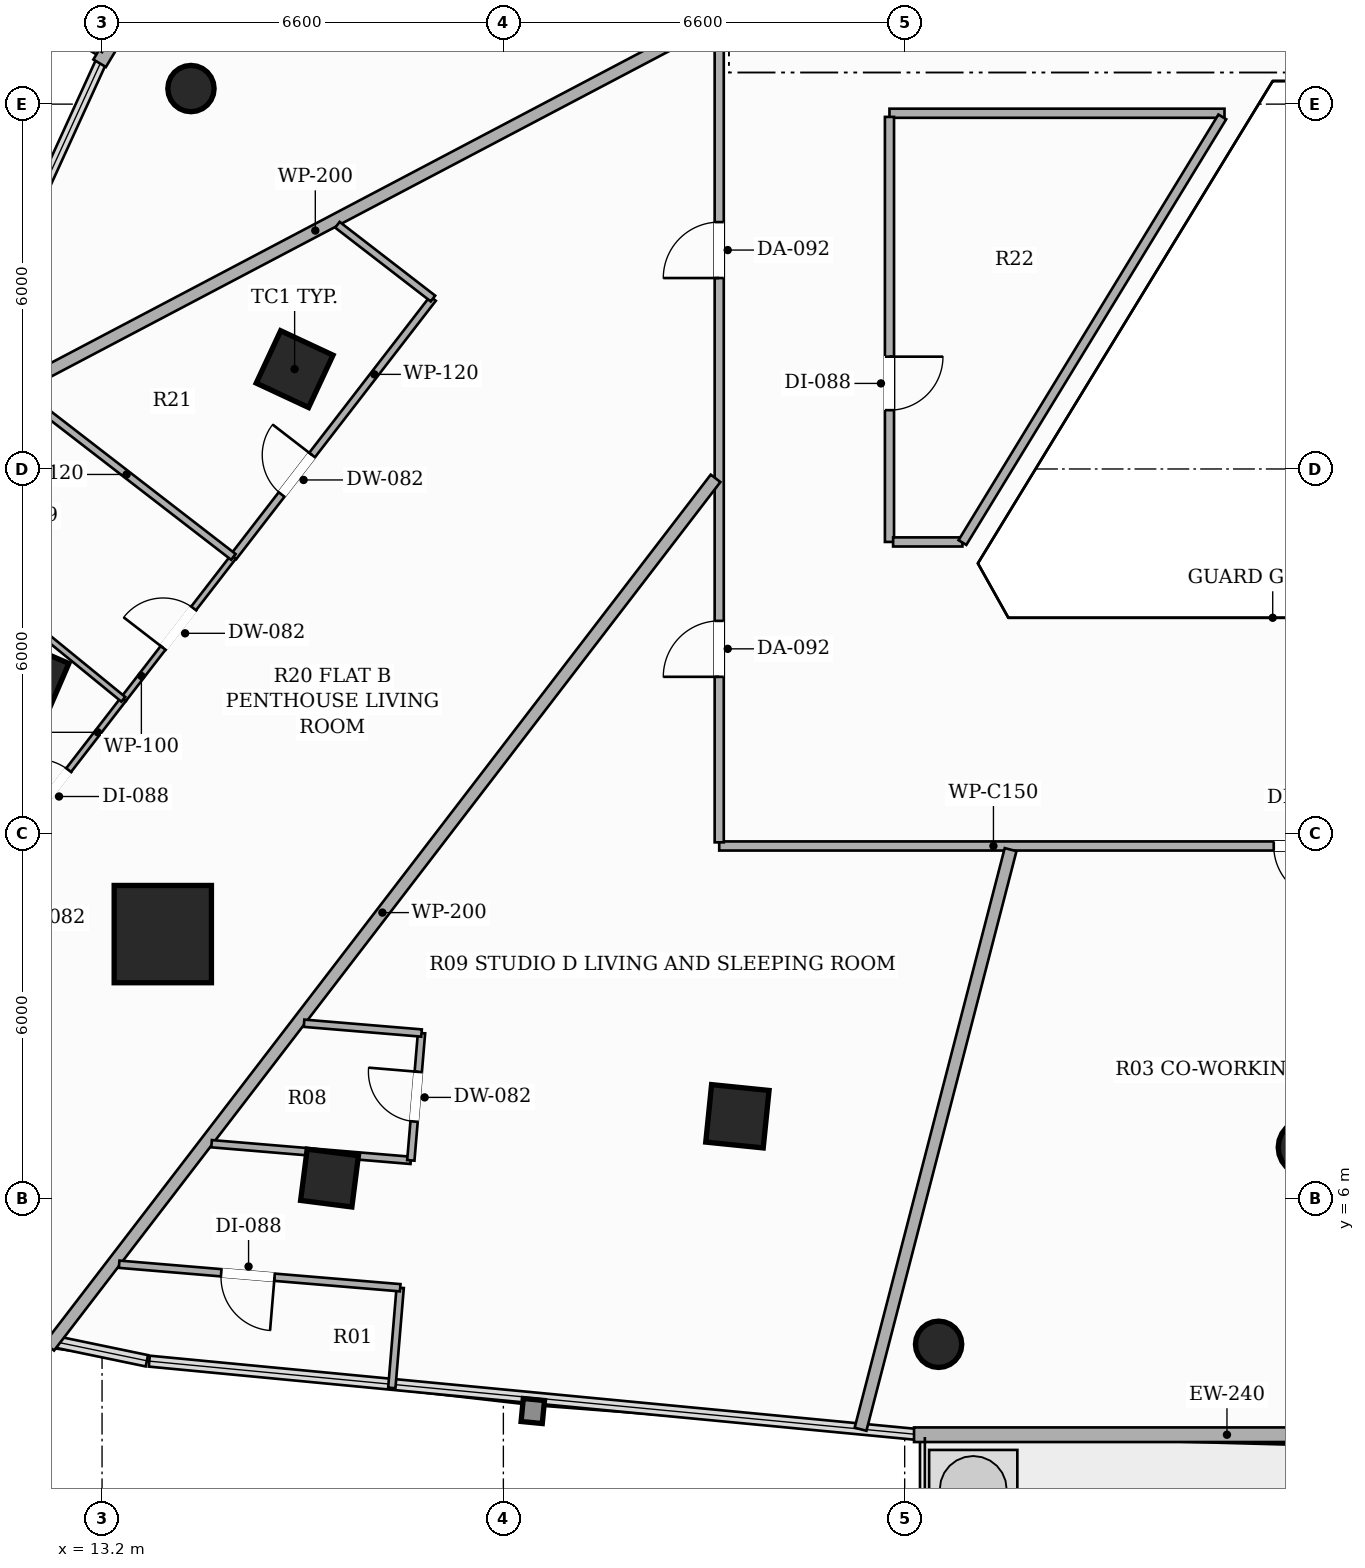
"""IFC4 building model, lengths in metres.
Left out: names, types, materials, properties, quantities, classifications, styles, units other than length and angle.
Written with IfcOpenShell. Run it as: python <this file> out.ifc"""

import sys

from ifc_helpers import new_model, si_unit, direction, frame, frame_2d, origin, origin_2d, place, context, subcontext, project, spatial, rectangle, hollow_rectangle, hollow_circle, extrude, element, fill, save


model = new_model("IFC4")
c1 = context("Model", 3, precision=1e-05, world=origin(), true_north=direction((0.0, 1.0)))
c2 = subcontext(c1, "Body", "Model", "MODEL_VIEW")
j1 = project(units=[si_unit("LENGTHUNIT", "METRE"), si_unit("PLANEANGLEUNIT", "RADIAN")], contexts=[c1])
p1 = place(None, origin())
s1 = spatial("IfcSite", under=j1, at=p1, CompositionType="ELEMENT")
p2 = place(p1, origin())
s2 = spatial("IfcBuilding", under=s1, at=p2, CompositionType="ELEMENT")
p3 = place(p2, frame((0.0, 0.0, 77.45)))
s3 = spatial("IfcBuildingStorey", under=s2, at=p3, CompositionType="ELEMENT", Elevation=77.45)
p4 = place(p3, frame((14.199, 10.351, 0.0), z_axis=(0.0, 0.0, 1.0), x_axis=(1.0, 0.0, 0.0)))
e1 = element("IfcColumn", 1, at=p4, inside=s3, PredefinedType="COLUMN", context=c2, shape_type="SweptSolid", body=[
    extrude(hollow_rectangle(XDim=1.6, YDim=1.6, WallThickness=0.05, at=origin_2d()), origin(), (0.0, 0.0, 1.0), 3.3),
])
for number, where, z_axis, x_axis in (
    (2, (16.367, 19.642, 0.0), (0.0, 0.0, 1.0), (0.423, 0.906, 0.0)),
    (3, (23.649, 7.355, 0.0), (0.0, 0.0, 1.0), (-0.995, 0.101, 0.0)),
):
    element("IfcColumn", number, at=place(p3, frame(where, z_axis=z_axis, x_axis=x_axis)), inside=s3, PredefinedType="COLUMN", context=c2, shape_type="SweptSolid", body=[
        extrude(hollow_rectangle(XDim=0.95, YDim=0.95, WallThickness=0.032, at=origin_2d()), origin(), (0.0, 0.0, 1.0), 3.3),
    ])
p5 = place(p3, frame((33.0, 6.844, 0.0), z_axis=(0.0, 0.0, 1.0), x_axis=(1.0, 0.0, 0.0)))
e4 = element("IfcColumn", 4, at=p5, inside=s3, PredefinedType="COLUMN", context=c2, shape_type="SweptSolid", body=[
    extrude(hollow_circle(Radius=0.457, WallThickness=0.025, at=origin_2d()), origin(), (0.0, 0.0, 1.0), 3.3),
])
for number, where, z_axis, x_axis in (
    (5, (12.095, 14.58, 0.0), (0.0, 0.0, 1.0), (0.397, 0.918, 0.0)),
    (6, (16.941, 6.339, 0.0), (0.0, 0.0, 1.0), (-0.992, 0.127, 0.0)),
):
    element("IfcColumn", number, at=place(p3, frame(where, z_axis=z_axis, x_axis=x_axis)), inside=s3, PredefinedType="COLUMN", context=c2, shape_type="SweptSolid", body=[
        extrude(hollow_rectangle(XDim=0.85, YDim=0.85, WallThickness=0.028, at=origin_2d()), origin(), (0.0, 0.0, 1.0), 3.3),
    ])
for number, where, z_axis, x_axis in (
    (7, (14.662, 24.256, 0.0), (0.0, 0.0, 1.0), (1.0, 0.0, 0.0)),
    (8, (26.958, 3.605, 0.0), (0.0, 0.0, 1.0), (1.0, 0.0, 0.0)),
):
    element("IfcColumn", number, at=place(p3, frame(where, z_axis=z_axis, x_axis=x_axis)), inside=s3, PredefinedType="COLUMN", context=c2, shape_type="SweptSolid", body=[
        extrude(hollow_circle(Radius=0.381, WallThickness=0.022, at=origin_2d()), origin(), (0.0, 0.0, 1.0), 3.3),
    ])
p6 = place(p3, frame((19.576, 35.37, 0.0), z_axis=(0.0, 0.0, 1.0), x_axis=(-0.514331693128, -0.85759134175, 0.0)))
e9 = element("IfcWall", 9, at=p6, inside=s3, PredefinedType="SOLIDWALL", context=c2, shape_type="SweptSolid", body=[
    extrude(rectangle(XDim=12.474, YDim=0.24, at=frame_2d((6.237, 0.0))), origin(), (0.0, 0.0, 1.0), 2.624),
])
p7 = place(p6, frame((9.977, 0.0, 0.0)))
e10 = element("IfcOpeningElement", 10, at=p7, cuts=e9, PredefinedType="OPENING", context=c2, shape_type="SweptSolid", body=[
    extrude(rectangle(XDim=1.8, YDim=2.2, at=frame_2d((0.9, 1.1))), frame((0.0, 0.13, 0.0), z_axis=(0.0, -1.0, 0.0), x_axis=(1.0, 0.0, 0.0)), (0.0, 0.0, 1.0), 0.26),
])
p8 = place(p3, frame((26.554, 2.118, 0.0), z_axis=(0.0, 0.0, 1.0), x_axis=(1.0, 0.0, 0.0)))
e11 = element("IfcWall", 11, at=p8, inside=s3, PredefinedType="SOLIDWALL", context=c2, shape_type="SweptSolid", body=[
    extrude(rectangle(XDim=12.891, YDim=0.24, at=frame_2d((6.446, 0.0))), origin(), (0.0, 0.0, 1.0), 2.624),
])
p9 = place(p8, frame((10.393, 0.0, 0.0)))
e12 = element("IfcOpeningElement", 12, at=p9, cuts=e11, PredefinedType="OPENING", context=c2, shape_type="SweptSolid", body=[
    extrude(rectangle(XDim=1.8, YDim=2.2, at=frame_2d((0.9, 1.1))), frame((0.0, 0.13, 0.0), z_axis=(0.0, -1.0, 0.0), x_axis=(1.0, 0.0, 0.0)), (0.0, 0.0, 1.0), 0.26),
])
p10 = place(p3, frame((42.59, 11.8, 0.0), z_axis=(0.0, 0.0, 1.0), x_axis=(-1.0, 0.0, 0.0)))
e13 = element("IfcWall", 13, at=p10, inside=s3, PredefinedType="PARTITIONING", context=c2, shape_type="SweptSolid", body=[
    extrude(rectangle(XDim=19.24, YDim=0.15, at=frame_2d((9.62, 0.0))), origin(), (0.0, 0.0, 1.0), 2.669),
])
p11 = place(p10, frame((9.24, 0.0, 0.0)))
e14 = element("IfcOpeningElement", 14, at=p11, cuts=e13, PredefinedType="OPENING", context=c2, shape_type="SweptSolid", body=[
    extrude(rectangle(XDim=0.88, YDim=2.1, at=frame_2d((0.44, 1.05))), frame((0.0, 0.085, 0.0), z_axis=(0.0, -1.0, 0.0), x_axis=(1.0, 0.0, 0.0)), (0.0, 0.0, 1.0), 0.17),
])
p12 = place(p10, frame((2.174, 0.0, 0.0)))
e15 = element("IfcOpeningElement", 15, at=p12, cuts=e13, PredefinedType="OPENING", context=c2, shape_type="SweptSolid", body=[
    extrude(rectangle(XDim=0.88, YDim=2.1, at=frame_2d((0.44, 1.05))), frame((0.0, 0.085, 0.0), z_axis=(0.0, -1.0, 0.0), x_axis=(1.0, 0.0, 0.0)), (0.0, 0.0, 1.0), 0.17),
])
p13 = place(p3, frame((23.35, 11.86, 0.0), z_axis=(0.0, 0.0, 1.0), x_axis=(0.0, 1.0, 0.0)))
e16 = element("IfcWall", 16, at=p13, inside=s3, PredefinedType="PARTITIONING", context=c2, shape_type="SweptSolid", body=[
    extrude(rectangle(XDim=25.04, YDim=0.15, at=frame_2d((12.52, 0.0))), origin(), (0.0, 0.0, 1.0), 2.413),
])
p14 = place(p13, frame((18.695, 0.0, 0.0)))
e17 = element("IfcOpeningElement", 17, at=p14, cuts=e16, PredefinedType="OPENING", context=c2, shape_type="SweptSolid", body=[
    extrude(rectangle(XDim=0.88, YDim=2.1, at=frame_2d((0.44, 1.05))), frame((0.0, 0.085, 0.0), z_axis=(0.0, -1.0, 0.0), x_axis=(1.0, 0.0, 0.0)), (0.0, 0.0, 1.0), 0.17),
])
p15 = place(p13, frame((9.28, 0.0, 0.0)))
e18 = element("IfcOpeningElement", 18, at=p15, cuts=e16, PredefinedType="OPENING", context=c2, shape_type="SweptSolid", body=[
    extrude(rectangle(XDim=0.92, YDim=2.15, at=frame_2d((0.46, 1.075))), frame((0.0, 0.085, 0.0), z_axis=(0.0, -1.0, 0.0), x_axis=(1.0, 0.0, 0.0)), (0.0, 0.0, 1.0), 0.17),
])
p16 = place(p13, frame((2.722, 0.0, 0.0)))
e19 = element("IfcOpeningElement", 19, at=p16, cuts=e16, PredefinedType="OPENING", context=c2, shape_type="SweptSolid", body=[
    extrude(rectangle(XDim=0.92, YDim=2.15, at=frame_2d((0.46, 1.075))), frame((0.0, 0.085, 0.0), z_axis=(0.0, -1.0, 0.0), x_axis=(1.0, 0.0, 0.0)), (0.0, 0.0, 1.0), 0.17),
])
p17 = place(p3, frame((31.66, 23.85, 0.0), z_axis=(0.0, 0.0, 1.0), x_axis=(-1.0, 0.0, 0.0)))
e20 = element("IfcWall", 20, at=p17, inside=s3, PredefinedType="PARTITIONING", context=c2, shape_type="SweptSolid", body=[
    extrude(rectangle(XDim=5.51, YDim=0.15, at=frame_2d((2.755, 0.0))), origin(), (0.0, 0.0, 1.0), 2.669),
])
p18 = place(p3, frame((26.15, 23.79, 0.0), z_axis=(0.0, 0.0, 1.0), x_axis=(0.0, -1.0, 0.0)))
e21 = element("IfcWall", 21, at=p18, inside=s3, PredefinedType="PARTITIONING", context=c2, shape_type="SweptSolid", body=[
    extrude(rectangle(XDim=6.99, YDim=0.15, at=frame_2d((3.495, 0.0))), origin(), (0.0, 0.0, 1.0), 2.669),
])
p19 = place(p18, frame((3.943, 0.0, 0.0)))
e22 = element("IfcOpeningElement", 22, at=p19, cuts=e21, PredefinedType="OPENING", context=c2, shape_type="SweptSolid", body=[
    extrude(rectangle(XDim=0.88, YDim=2.1, at=frame_2d((0.44, 1.05))), frame((0.0, 0.085, 0.0), z_axis=(0.0, -1.0, 0.0), x_axis=(1.0, 0.0, 0.0)), (0.0, 0.0, 1.0), 0.17),
])
p20 = place(p3, frame((26.21, 16.8, 0.0), z_axis=(0.0, 0.0, 1.0), x_axis=(1.0, 0.0, 0.0)))
e23 = element("IfcWall", 23, at=p20, inside=s3, PredefinedType="PARTITIONING", context=c2, shape_type="SweptSolid", body=[
    extrude(rectangle(XDim=1.14, YDim=0.15, at=frame_2d((0.57, 0.0))), origin(), (0.0, 0.0, 1.0), 3.06),
])
p21 = place(p3, frame((27.35, 16.79, 0.0), z_axis=(0.0, 0.0, 1.0), x_axis=(0.521108010454, 0.853490738931, 0.0)))
e24 = element("IfcWall", 24, at=p21, inside=s3, PredefinedType="PARTITIONING", context=c2, shape_type="SweptSolid", body=[
    extrude(rectangle(XDim=8.202, YDim=0.15, at=frame_2d((4.101, 0.0))), origin(), (0.0, 0.0, 1.0), 2.669),
])
p22 = place(p3, frame((23.29, 25.387, 0.0), z_axis=(0.0, 0.0, 1.0), x_axis=(-0.884824599801, -0.465924272373, 0.0)))
e25 = element("IfcWall", 25, at=p22, inside=s3, PredefinedType="PARTITIONING", context=c2, shape_type="SweptSolid", body=[
    extrude(rectangle(XDim=14.88, YDim=0.2, at=frame_2d((7.44, 0.0))), origin(), (0.0, 0.0, 1.0), 2.413),
])
p23 = place(p3, frame((23.29, 17.846, 0.0), z_axis=(0.0, 0.0, 1.0), x_axis=(-0.608736412859, -0.793372535232, 0.0)))
e26 = element("IfcWall", 26, at=p23, inside=s3, PredefinedType="PARTITIONING", context=c2, shape_type="SweptSolid", body=[
    extrude(rectangle(XDim=18.003, YDim=0.2, at=frame_2d((9.001, 0.0))), origin(), (0.0, 0.0, 1.0), 2.413),
])
p24 = place(p3, frame((28.142, 11.74, 0.0), z_axis=(0.0, 0.0, 1.0), x_axis=(-0.250654087156, -0.968076716274, 0.0)))
e27 = element("IfcWall", 27, at=p24, inside=s3, PredefinedType="PARTITIONING", context=c2, shape_type="SweptSolid", body=[
    extrude(rectangle(XDim=9.846, YDim=0.2, at=frame_2d((4.923, 0.0))), origin(), (0.0, 0.0, 1.0), 2.413),
])
p25 = place(p3, frame((15.36, 16.554, 0.0), z_axis=(0.0, 0.0, 1.0), x_axis=(0.611289599194, 0.791406991324, 0.0)))
e28 = element("IfcWall", 28, at=p25, inside=s3, PredefinedType="PARTITIONING", context=c2, shape_type="SweptSolid", body=[
    extrude(rectangle(XDim=5.369, YDim=0.12, at=frame_2d((2.685, 0.0))), origin(), (0.0, 0.0, 1.0), 2.669),
])
p26 = place(p25, frame((1.297, 0.0, 0.0)))
e29 = element("IfcOpeningElement", 29, at=p26, cuts=e28, PredefinedType="OPENING", context=c2, shape_type="SweptSolid", body=[
    extrude(rectangle(XDim=0.82, YDim=2.1, at=frame_2d((0.41, 1.05))), frame((0.0, 0.07, 0.0), z_axis=(0.0, -1.0, 0.0), x_axis=(1.0, 0.0, 0.0)), (0.0, 0.0, 1.0), 0.14),
])
p27 = place(p3, frame((18.642, 20.803, 0.0), z_axis=(0.0, 0.0, 1.0), x_axis=(-0.791493240875, 0.611177919799, 0.0)))
e30 = element("IfcWall", 30, at=p27, inside=s3, PredefinedType="PARTITIONING", context=c2, shape_type="SweptSolid", body=[
    extrude(rectangle(XDim=1.985, YDim=0.12, at=frame_2d((0.992, 0.0))), origin(), (0.0, 0.0, 1.0), 2.669),
])
p28 = place(p3, frame((11.741, 11.87, 0.0), z_axis=(0.0, 0.0, 1.0), x_axis=(0.61134418085, 0.791364828976, 0.0)))
e31 = element("IfcWall", 31, at=p28, inside=s3, PredefinedType="PARTITIONING", context=c2, shape_type="SweptSolid", body=[
    extrude(rectangle(XDim=2.959, YDim=0.1, at=frame_2d((1.479, 0.0))), origin(), (0.0, 0.0, 1.0), 2.413),
])
p29 = place(p28, frame((0.608, 0.0, 0.0)))
e32 = element("IfcOpeningElement", 32, at=p29, cuts=e31, PredefinedType="OPENING", context=c2, shape_type="SweptSolid", body=[
    extrude(rectangle(XDim=0.88, YDim=2.1, at=frame_2d((0.44, 1.05))), frame((0.0, 0.06, 0.0), z_axis=(0.0, -1.0, 0.0), x_axis=(1.0, 0.0, 0.0)), (0.0, 0.0, 1.0), 0.12),
])
p30 = place(p3, frame((13.55, 14.212, 0.0), z_axis=(0.0, 0.0, 1.0), x_axis=(0.611510880037, 0.791236022686, 0.0)))
e33 = element("IfcWall", 33, at=p30, inside=s3, PredefinedType="PARTITIONING", context=c2, shape_type="SweptSolid", body=[
    extrude(rectangle(XDim=2.96, YDim=0.1, at=frame_2d((1.48, 0.0))), origin(), (0.0, 0.0, 1.0), 3.06),
])
p31 = place(p30, frame((1.07, 0.0, 0.0)))
e34 = element("IfcOpeningElement", 34, at=p31, cuts=e33, PredefinedType="OPENING", context=c2, shape_type="SweptSolid", body=[
    extrude(rectangle(XDim=0.82, YDim=2.1, at=frame_2d((0.41, 1.05))), frame((0.0, 0.06, 0.0), z_axis=(0.0, -1.0, 0.0), x_axis=(1.0, 0.0, 0.0)), (0.0, 0.0, 1.0), 0.12),
])
p32 = place(p3, frame((15.36, 16.554, 0.0), z_axis=(0.0, 0.0, 1.0), x_axis=(-0.79138059941, 0.611323766, 0.0)))
e35 = element("IfcWall", 35, at=p32, inside=s3, PredefinedType="PARTITIONING", context=c2, shape_type="SweptSolid", body=[
    extrude(rectangle(XDim=4.437, YDim=0.12, at=frame_2d((2.218, 0.0))), origin(), (0.0, 0.0, 1.0), 2.413),
])
p33 = place(p3, frame((9.654, 17.394, 0.0), z_axis=(0.0, 0.0, 1.0), x_axis=(0.774493289837, -0.63258212431, 0.0)))
e36 = element("IfcWall", 36, at=p33, inside=s3, PredefinedType="PARTITIONING", context=c2, shape_type="SweptSolid", body=[
    extrude(rectangle(XDim=5.03, YDim=0.1, at=frame_2d((2.515, 0.0))), origin(), (0.0, 0.0, 1.0), 2.413),
])
p34 = place(p3, frame((15.001, 6.904, 0.0), z_axis=(0.0, 0.0, 1.0), x_axis=(0.996518569178, -0.083371105803, 0.0)))
e37 = element("IfcWall", 37, at=p34, inside=s3, PredefinedType="PARTITIONING", context=c2, shape_type="SweptSolid", body=[
    extrude(rectangle(XDim=3.289, YDim=0.12, at=frame_2d((1.644, 0.0))), origin(), (0.0, 0.0, 1.0), 2.413),
])
p35 = place(p3, frame((18.278, 6.63, 0.0), z_axis=(0.0, 0.0, 1.0), x_axis=(0.083756885487, 0.996486218737, 0.0)))
e38 = element("IfcWall", 38, at=p35, inside=s3, PredefinedType="PARTITIONING", context=c2, shape_type="SweptSolid", body=[
    extrude(rectangle(XDim=2.102, YDim=0.12, at=frame_2d((1.051, 0.0))), origin(), (0.0, 0.0, 1.0), 2.413),
])
p36 = place(p35, frame((0.641, 0.0, 0.0)))
e39 = element("IfcOpeningElement", 39, at=p36, cuts=e38, PredefinedType="OPENING", context=c2, shape_type="SweptSolid", body=[
    extrude(rectangle(XDim=0.82, YDim=2.1, at=frame_2d((0.41, 1.05))), frame((0.0, 0.07, 0.0), z_axis=(0.0, -1.0, 0.0), x_axis=(1.0, 0.0, 0.0)), (0.0, 0.0, 1.0), 0.14),
])
p37 = place(p3, frame((18.454, 8.724, 0.0), z_axis=(0.0, 0.0, 1.0), x_axis=(-0.996550966871, 0.082982952637, 0.0)))
e40 = element("IfcWall", 40, at=p37, inside=s3, PredefinedType="PARTITIONING", context=c2, shape_type="SweptSolid", body=[
    extrude(rectangle(XDim=1.939, YDim=0.12, at=frame_2d((0.969, 0.0))), origin(), (0.0, 0.0, 1.0), 2.669),
])
p38 = place(p3, frame((17.965, 2.887, 0.0), z_axis=(0.0, 0.0, 1.0), x_axis=(0.083412008543, 0.996515146313, 0.0)))
e41 = element("IfcWall", 41, at=p38, inside=s3, PredefinedType="PARTITIONING", context=c2, shape_type="SweptSolid", body=[
    extrude(rectangle(XDim=1.654, YDim=0.12, at=frame_2d((0.827, 0.0))), origin(), (0.0, 0.0, 1.0), 2.619),
])
p39 = place(p3, frame((18.103, 4.535, 0.0), z_axis=(0.0, 0.0, 1.0), x_axis=(-0.99650936218, 0.083481082211, 0.0)))
e42 = element("IfcWall", 42, at=p39, inside=s3, PredefinedType="PARTITIONING", context=c2, shape_type="SweptSolid", body=[
    extrude(rectangle(XDim=4.638, YDim=0.12, at=frame_2d((2.319, 0.0))), origin(), (0.0, 0.0, 1.0), 2.619),
])
p40 = place(p39, frame((2.074, 0.0, 0.0)))
e43 = element("IfcOpeningElement", 43, at=p40, cuts=e42, PredefinedType="OPENING", context=c2, shape_type="SweptSolid", body=[
    extrude(rectangle(XDim=0.88, YDim=2.1, at=frame_2d((0.44, 1.05))), frame((0.0, 0.07, 0.0), z_axis=(0.0, -1.0, 0.0), x_axis=(1.0, 0.0, 0.0)), (0.0, 0.0, 1.0), 0.14),
])
p41 = place(p15, origin())
e44 = element("IfcDoor", 44, at=p41, inside=s3, OperationType="SINGLE_SWING_LEFT", PredefinedType="DOOR", context=c2, shape_type="SweptSolid", body=[
    extrude(rectangle(XDim=0.92, YDim=2.15, at=frame_2d((0.46, 1.075))), frame((0.0, 0.025, 0.0), z_axis=(0.0, -1.0, 0.0), x_axis=(1.0, 0.0, 0.0)), (0.0, 0.0, 1.0), 0.05),
])
fill(e18, e44)
p42 = place(p26, origin())
e45 = element("IfcDoor", 45, at=p42, inside=s3, OperationType="SINGLE_SWING_RIGHT", PredefinedType="DOOR", context=c2, shape_type="SweptSolid", body=[
    extrude(rectangle(XDim=0.82, YDim=2.1, at=frame_2d((0.41, 1.05))), frame((0.0, 0.025, 0.0), z_axis=(0.0, -1.0, 0.0), x_axis=(1.0, 0.0, 0.0)), (0.0, 0.0, 1.0), 0.05),
])
fill(e29, e45)
p43 = place(p29, origin())
e46 = element("IfcDoor", 46, at=p43, inside=s3, OperationType="SINGLE_SWING_LEFT", PredefinedType="DOOR", context=c2, shape_type="SweptSolid", body=[
    extrude(rectangle(XDim=0.88, YDim=2.1, at=frame_2d((0.44, 1.05))), frame((0.0, 0.025, 0.0), z_axis=(0.0, -1.0, 0.0), x_axis=(1.0, 0.0, 0.0)), (0.0, 0.0, 1.0), 0.05),
])
fill(e32, e46)
p44 = place(p31, origin())
e47 = element("IfcDoor", 47, at=p44, inside=s3, OperationType="SINGLE_SWING_LEFT", PredefinedType="DOOR", context=c2, shape_type="SweptSolid", body=[
    extrude(rectangle(XDim=0.82, YDim=2.1, at=frame_2d((0.41, 1.05))), frame((0.0, 0.025, 0.0), z_axis=(0.0, -1.0, 0.0), x_axis=(1.0, 0.0, 0.0)), (0.0, 0.0, 1.0), 0.05),
])
fill(e34, e47)
p45 = place(p16, origin())
e48 = element("IfcDoor", 48, at=p45, inside=s3, OperationType="SINGLE_SWING_LEFT", PredefinedType="DOOR", context=c2, shape_type="SweptSolid", body=[
    extrude(rectangle(XDim=0.92, YDim=2.15, at=frame_2d((0.46, 1.075))), frame((0.0, 0.025, 0.0), z_axis=(0.0, -1.0, 0.0), x_axis=(1.0, 0.0, 0.0)), (0.0, 0.0, 1.0), 0.05),
])
fill(e19, e48)
p46 = place(p36, origin())
e49 = element("IfcDoor", 49, at=p46, inside=s3, OperationType="SINGLE_SWING_RIGHT", PredefinedType="DOOR", context=c2, shape_type="SweptSolid", body=[
    extrude(rectangle(XDim=0.82, YDim=2.1, at=frame_2d((0.41, 1.05))), frame((0.0, 0.025, 0.0), z_axis=(0.0, -1.0, 0.0), x_axis=(1.0, 0.0, 0.0)), (0.0, 0.0, 1.0), 0.05),
])
fill(e39, e49)
p47 = place(p40, origin())
e50 = element("IfcDoor", 50, at=p47, inside=s3, OperationType="SINGLE_SWING_LEFT", PredefinedType="DOOR", context=c2, shape_type="SweptSolid", body=[
    extrude(rectangle(XDim=0.88, YDim=2.1, at=frame_2d((0.44, 1.05))), frame((0.0, 0.025, 0.0), z_axis=(0.0, -1.0, 0.0), x_axis=(1.0, 0.0, 0.0)), (0.0, 0.0, 1.0), 0.05),
])
fill(e43, e50)
p48 = place(p11, origin())
e51 = element("IfcDoor", 51, at=p48, inside=s3, OperationType="SINGLE_SWING_LEFT", PredefinedType="DOOR", context=c2, shape_type="SweptSolid", body=[
    extrude(rectangle(XDim=0.88, YDim=2.1, at=frame_2d((0.44, 1.05))), frame((0.0, 0.025, 0.0), z_axis=(0.0, -1.0, 0.0), x_axis=(1.0, 0.0, 0.0)), (0.0, 0.0, 1.0), 0.05),
])
fill(e14, e51)
p49 = place(p19, origin())
e52 = element("IfcDoor", 52, at=p49, inside=s3, OperationType="SINGLE_SWING_LEFT", PredefinedType="DOOR", context=c2, shape_type="SweptSolid", body=[
    extrude(rectangle(XDim=0.88, YDim=2.1, at=frame_2d((0.44, 1.05))), frame((0.0, 0.025, 0.0), z_axis=(0.0, -1.0, 0.0), x_axis=(1.0, 0.0, 0.0)), (0.0, 0.0, 1.0), 0.05),
])
fill(e22, e52)
save(model, sys.argv[1])
